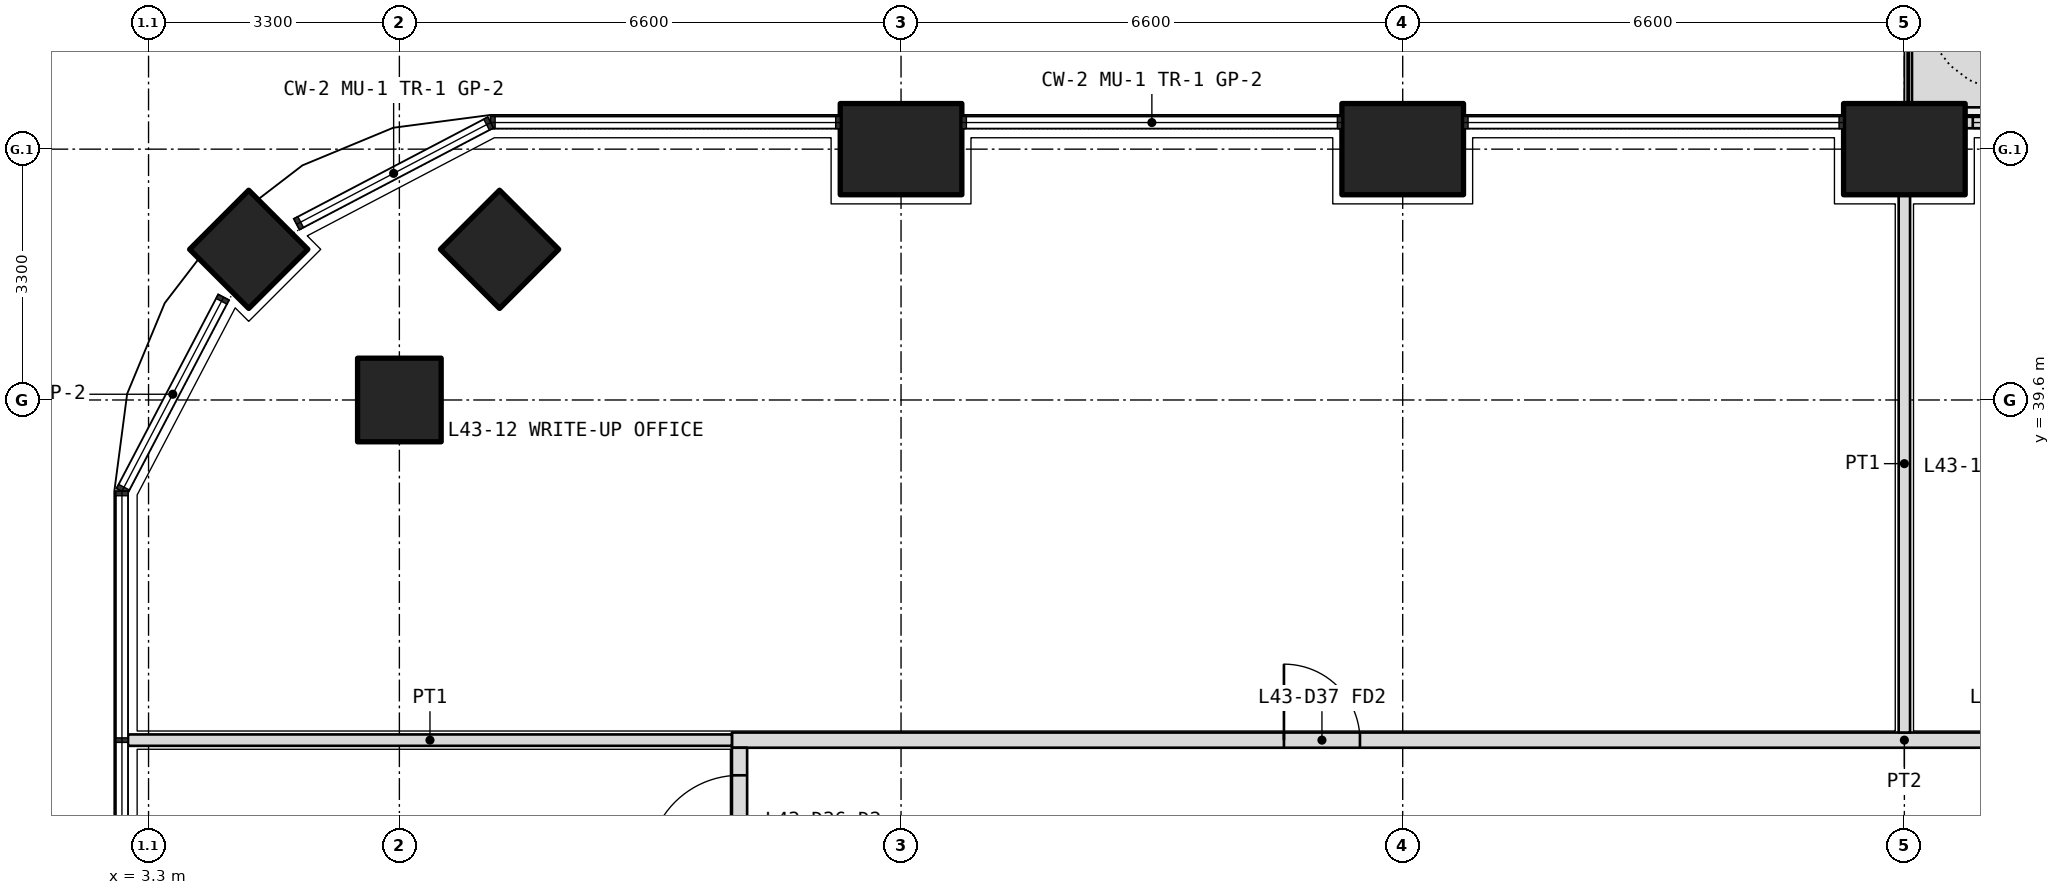
"""IFC4 building model, lengths in metres.
Left out: names, types, materials, properties, quantities, classifications, styles, units other than length and angle.
Written with IfcOpenShell. Run it as: python <this file> out.ifc"""

import sys

from ifc_helpers import new_model, si_unit, direction, frame, frame_2d, origin, origin_2d, place, context, subcontext, project, spatial, polyline, rectangle, outline, extrude, element, fill, save


model = new_model("IFC4")
c1 = context("Model", 3, precision=1e-05, world=origin(), true_north=direction((0.0, 1.0)))
c2 = subcontext(c1, "Body", "Model", "MODEL_VIEW")
j1 = project(units=[si_unit("LENGTHUNIT", "METRE"), si_unit("PLANEANGLEUNIT", "RADIAN")], contexts=[c1])
p1 = place(None, origin())
s1 = spatial("IfcSite", under=j1, at=p1, CompositionType="ELEMENT")
p2 = place(p1, origin())
s2 = spatial("IfcBuilding", under=s1, at=p2, CompositionType="ELEMENT")
p3 = place(p2, frame((0.0, 0.0, 189.3)))
s3 = spatial("IfcBuildingStorey", under=s2, at=p3, CompositionType="ELEMENT", Elevation=189.3)
p4 = place(p3, frame((4.618, 41.582, 0.0), z_axis=(0.0, 0.0, 1.0), x_axis=(0.707106781187, 0.707106781187, 0.0)))
e1 = element("IfcColumn", 1, at=p4, inside=s3, PredefinedType="COLUMN", context=c2, shape_type="SweptSolid", body=[
    extrude(rectangle(XDim=1.1, YDim=1.1, at=origin_2d()), origin(), (0.0, 0.0, 1.0), 4.2),
])
for number, where, z_axis, x_axis in (
    (2, (13.2, 42.9, 0.0), (0.0, 0.0, 1.0), (1.0, 0.0, 0.0)),
    (3, (19.8, 42.9, 0.0), (0.0, 0.0, 1.0), (1.0, 0.0, 0.0)),
    (4, (26.4, 42.9, 0.0), (0.0, 0.0, 1.0), (1.0, 0.0, 0.0)),
):
    element("IfcColumn", number, at=place(p3, frame(where, z_axis=z_axis, x_axis=x_axis)), inside=s3, PredefinedType="COLUMN", context=c2, shape_type="SweptSolid", body=[
        extrude(rectangle(XDim=1.6, YDim=1.2, at=origin_2d()), origin(), (0.0, 0.0, 1.0), 4.2),
    ])
for number, where, z_axis, x_axis in (
    (5, (6.6, 39.6, 0.0), (0.0, 0.0, 1.0), (1.0, 0.0, 0.0)),
    (6, (7.918, 41.582, 0.0), (0.0, 0.0, 1.0), (0.707, 0.707, 0.0)),
):
    element("IfcColumn", number, at=place(p3, frame(where, z_axis=z_axis, x_axis=x_axis)), inside=s3, PredefinedType="COLUMN", context=c2, shape_type="SweptSolid", body=[
        extrude(rectangle(XDim=1.1, YDim=1.1, at=origin_2d()), origin(), (0.0, 0.0, 1.0), 4.2),
    ])
p5 = place(p3, origin())
e7 = element("IfcWall", 7, at=p5, inside=s3, PredefinedType="USERDEFINED", context=c2, shape_type="SweptSolid", body=[
    extrude(outline(polyline([(26.5, 43.45), (28.95, 43.45), (28.95, 44.45), (26.5, 44.45), (26.5, 43.45)]), holes=[polyline([(26.65, 43.6), (28.8, 43.6), (28.8, 44.3), (26.65, 44.3), (26.65, 43.6)])]), origin(), (0.0, 0.0, 1.0), 1.05),
])
p6 = place(p3, frame((32.2, 43.25, 0.0), z_axis=(0.0, 0.0, 1.0), x_axis=(-1.0, 0.0, 0.0)))
e8 = element("IfcWall", 8, at=p6, inside=s3, PredefinedType="SOLIDWALL", context=c2, shape_type="SweptSolid", body=[
    extrude(rectangle(XDim=5.0, YDim=0.15, at=frame_2d((2.5, 0.0))), origin(), (0.0, 0.0, 1.0), 2.7),
])
p7 = place(p6, frame((1.25, 0.0, 0.0)))
e9 = element("IfcOpeningElement", 9, at=p7, cuts=e8, PredefinedType="OPENING", context=c2, shape_type="SweptSolid", body=[
    extrude(rectangle(XDim=1.0, YDim=2.4, at=frame_2d((0.5, 1.2))), frame((0.0, 0.085, 0.0), z_axis=(0.0, -1.0, 0.0), x_axis=(1.0, 0.0, 0.0)), (0.0, 0.0, 1.0), 0.17),
])
p8 = place(p6, frame((0.1, 0.0, 0.1)))
e10 = element("IfcOpeningElement", 10, at=p8, cuts=e8, PredefinedType="OPENING", context=c2, shape_type="SweptSolid", body=[
    extrude(rectangle(XDim=1.05, YDim=2.3, at=frame_2d((0.525, 1.15))), frame((0.0, 0.085, 0.0), z_axis=(0.0, -1.0, 0.0), x_axis=(1.0, 0.0, 0.0)), (0.0, 0.0, 1.0), 0.17),
])
p9 = place(p6, frame((2.75, 0.0, 0.1)))
e11 = element("IfcOpeningElement", 11, at=p9, cuts=e8, PredefinedType="OPENING", context=c2, shape_type="SweptSolid", body=[
    extrude(rectangle(XDim=2.15, YDim=2.3, at=frame_2d((1.075, 1.15))), frame((0.0, 0.085, 0.0), z_axis=(0.0, -1.0, 0.0), x_axis=(1.0, 0.0, 0.0)), (0.0, 0.0, 1.0), 0.17),
])
p10 = place(p3, frame((10.975, 35.125, 0.0), z_axis=(0.0, 0.0, 1.0), x_axis=(1.0, 0.0, 0.0)))
e12 = element("IfcWall", 12, at=p10, inside=s3, PredefinedType="PARTITIONING", context=c2, shape_type="SweptSolid", body=[
    extrude(rectangle(XDim=30.85, YDim=0.2, at=frame_2d((15.425, 0.0))), origin(), (0.0, 0.0, 1.0), 2.85),
])
p11 = place(p10, frame((7.262, 0.0, 0.0)))
e13 = element("IfcOpeningElement", 13, at=p11, cuts=e12, PredefinedType="OPENING", context=c2, shape_type="SweptSolid", body=[
    extrude(rectangle(XDim=1.0, YDim=2.1, at=frame_2d((0.5, 1.05))), frame((0.0, 0.11, 0.0), z_axis=(0.0, -1.0, 0.0), x_axis=(1.0, 0.0, 0.0)), (0.0, 0.0, 1.0), 0.22),
])
p12 = place(p10, frame((16.625, 0.0, 0.0)))
e14 = element("IfcOpeningElement", 14, at=p12, cuts=e12, PredefinedType="OPENING", context=c2, shape_type="SweptSolid", body=[
    extrude(rectangle(XDim=1.0, YDim=2.1, at=frame_2d((0.5, 1.05))), frame((0.0, 0.11, 0.0), z_axis=(0.0, -1.0, 0.0), x_axis=(1.0, 0.0, 0.0)), (0.0, 0.0, 1.0), 0.22),
])
p13 = place(p10, frame((19.925, 0.0, 0.0)))
e15 = element("IfcOpeningElement", 15, at=p13, cuts=e12, PredefinedType="OPENING", context=c2, shape_type="SweptSolid", body=[
    extrude(rectangle(XDim=1.0, YDim=2.1, at=frame_2d((0.5, 1.05))), frame((0.0, 0.11, 0.0), z_axis=(0.0, -1.0, 0.0), x_axis=(1.0, 0.0, 0.0)), (0.0, 0.0, 1.0), 0.22),
])
p14 = place(p10, frame((24.725, 0.0, 0.0)))
e16 = element("IfcOpeningElement", 16, at=p14, cuts=e12, PredefinedType="OPENING", context=c2, shape_type="SweptSolid", body=[
    extrude(rectangle(XDim=1.2, YDim=2.1, at=frame_2d((0.6, 1.05))), frame((0.0, 0.11, 0.0), z_axis=(0.0, -1.0, 0.0), x_axis=(1.0, 0.0, 0.0)), (0.0, 0.0, 1.0), 0.22),
])
p15 = place(p10, frame((29.188, 0.0, 0.0)))
e17 = element("IfcOpeningElement", 17, at=p15, cuts=e12, PredefinedType="OPENING", context=c2, shape_type="SweptSolid", body=[
    extrude(rectangle(XDim=1.0, YDim=2.1, at=frame_2d((0.5, 1.05))), frame((0.0, 0.11, 0.0), z_axis=(0.0, -1.0, 0.0), x_axis=(1.0, 0.0, 0.0)), (0.0, 0.0, 1.0), 0.22),
])
p16 = place(p3, frame((11.075, 29.7, 0.0), z_axis=(0.0, 0.0, 1.0), x_axis=(0.0, 1.0, 0.0)))
e18 = element("IfcWall", 18, at=p16, inside=s3, PredefinedType="PARTITIONING", context=c2, shape_type="SweptSolid", body=[
    extrude(rectangle(XDim=5.325, YDim=0.2, at=frame_2d((2.663, 0.0))), origin(), (0.0, 0.0, 1.0), 2.85),
])
p17 = place(p16, frame((1.15, 0.0, 0.0)))
e19 = element("IfcOpeningElement", 19, at=p17, cuts=e18, PredefinedType="OPENING", context=c2, shape_type="SweptSolid", body=[
    extrude(rectangle(XDim=1.0, YDim=2.1, at=frame_2d((0.5, 1.05))), frame((0.0, 0.11, 0.0), z_axis=(0.0, -1.0, 0.0), x_axis=(1.0, 0.0, 0.0)), (0.0, 0.0, 1.0), 0.22),
])
p18 = place(p16, frame((3.762, 0.0, 0.0)))
e20 = element("IfcOpeningElement", 20, at=p18, cuts=e18, PredefinedType="OPENING", context=c2, shape_type="SweptSolid", body=[
    extrude(rectangle(XDim=1.2, YDim=2.1, at=frame_2d((0.6, 1.05))), frame((0.0, 0.11, 0.0), z_axis=(0.0, -1.0, 0.0), x_axis=(1.0, 0.0, 0.0)), (0.0, 0.0, 1.0), 0.22),
])
p19 = place(p3, frame((3.03, 35.125, 0.0), z_axis=(0.0, 0.0, 1.0), x_axis=(1.0, 0.0, 0.0)))
e21 = element("IfcWall", 21, at=p19, inside=s3, PredefinedType="PARTITIONING", context=c2, shape_type="SweptSolid", body=[
    extrude(rectangle(XDim=7.945, YDim=0.15, at=frame_2d((3.973, 0.0))), origin(), (0.0, 0.0, 1.0), 2.7),
])
p20 = place(p3, frame((26.4, 42.3, 0.0), z_axis=(0.0, 0.0, 1.0), x_axis=(0.0, -1.0, 0.0)))
e22 = element("IfcWall", 22, at=p20, inside=s3, PredefinedType="PARTITIONING", context=c2, shape_type="SweptSolid", body=[
    extrude(rectangle(XDim=7.075, YDim=0.15, at=frame_2d((3.538, 0.0))), origin(), (0.0, 0.0, 1.0), 2.85),
])
p21 = place(p9, origin())
e23 = element("IfcWindow", 23, at=p21, inside=s3, PartitioningType="SINGLE_PANEL", PredefinedType="WINDOW", context=c2, shape_type="SweptSolid", body=[
    extrude(rectangle(XDim=2.15, YDim=2.3, at=frame_2d((1.075, 1.15))), frame((0.0, 0.03, 0.0), z_axis=(0.0, -1.0, 0.0), x_axis=(1.0, 0.0, 0.0)), (0.0, 0.0, 1.0), 0.06),
])
fill(e11, e23)
p22 = place(p11, origin())
e24 = element("IfcDoor", 24, at=p22, inside=s3, OperationType="SINGLE_SWING_LEFT", PredefinedType="DOOR", context=c2, shape_type="SweptSolid", body=[
    extrude(rectangle(XDim=1.0, YDim=2.1, at=frame_2d((0.5, 1.05))), frame((0.0, 0.025, 0.0), z_axis=(0.0, -1.0, 0.0), x_axis=(1.0, 0.0, 0.0)), (0.0, 0.0, 1.0), 0.05),
])
fill(e13, e24)
p23 = place(p18, origin())
e25 = element("IfcDoor", 25, at=p23, inside=s3, OperationType="DOUBLE_DOOR_SINGLE_SWING", PredefinedType="DOOR", context=c2, shape_type="SweptSolid", body=[
    extrude(rectangle(XDim=1.2, YDim=2.1, at=frame_2d((0.6, 1.05))), frame((0.0, 0.025, 0.0), z_axis=(0.0, -1.0, 0.0), x_axis=(1.0, 0.0, 0.0)), (0.0, 0.0, 1.0), 0.05),
])
fill(e20, e25)
save(model, sys.argv[1])
